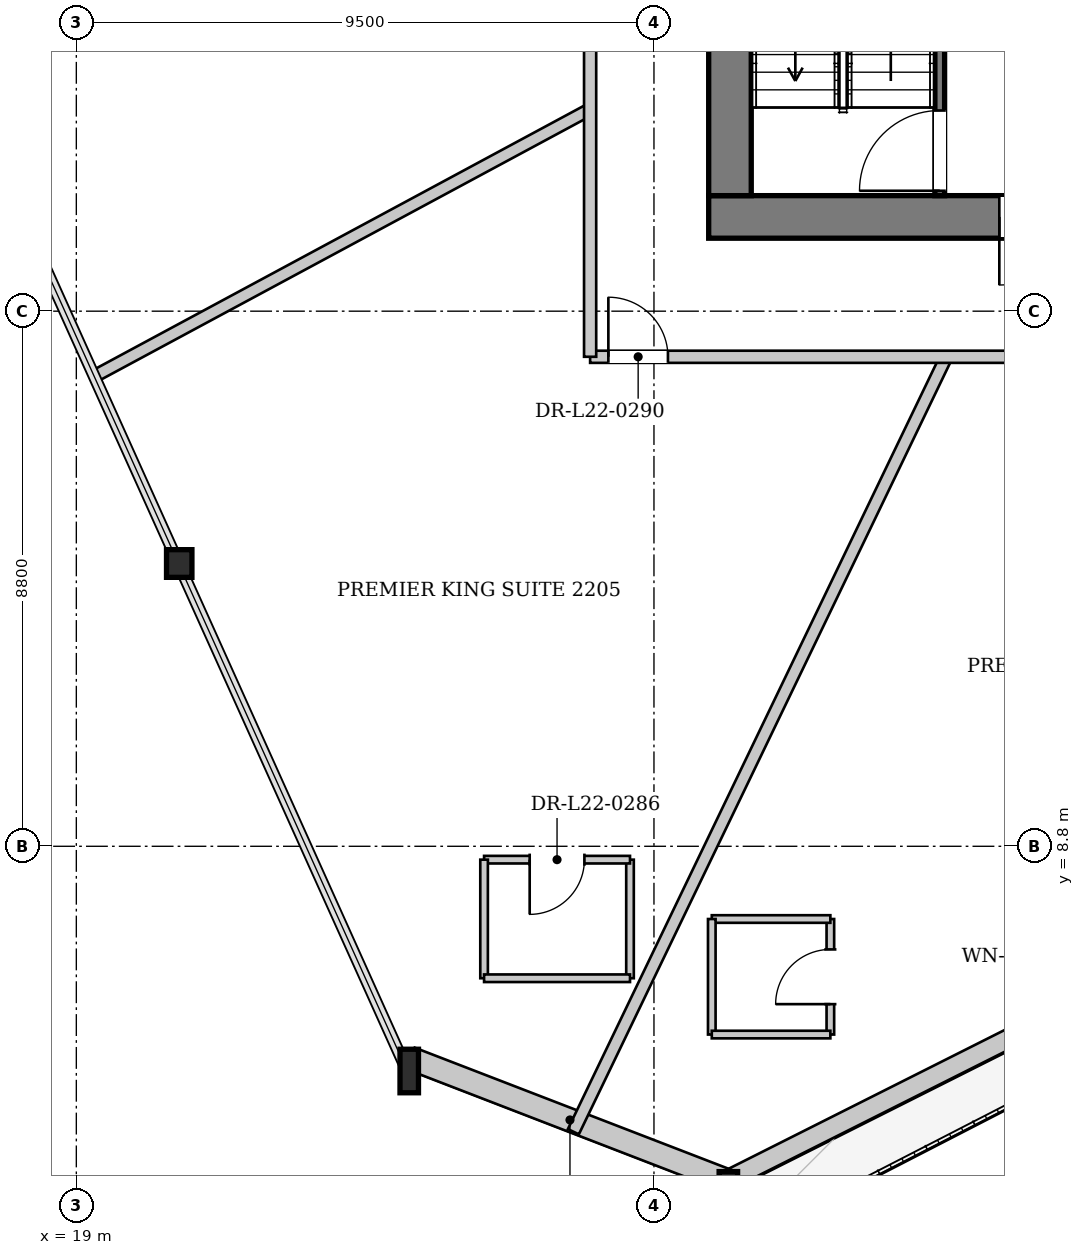
"""IFC4 building model, lengths in metres.
Left out: names, types, materials, properties, quantities, classifications, styles, units other than length and angle.
Written with IfcOpenShell. Run it as: python <this file> out.ifc"""

import sys

from ifc_helpers import new_model, si_unit, direction, frame, frame_2d, origin, origin_2d, place, context, subcontext, project, spatial, rectangle, i_section, extrude, source, transform, mapped, element, fill, save


model = new_model("IFC4")
c1 = context("Model", 3, precision=1e-05, world=origin(), true_north=direction((0.0, 1.0)))
c2 = subcontext(c1, "Body", "Model", "MODEL_VIEW")
j1 = project(units=[si_unit("LENGTHUNIT", "METRE"), si_unit("PLANEANGLEUNIT", "RADIAN")], contexts=[c1])
p1 = place(None, origin())
s1 = spatial("IfcSite", under=j1, at=p1, CompositionType="ELEMENT")
p2 = place(p1, origin())
s2 = spatial("IfcBuilding", under=s1, at=p2, CompositionType="ELEMENT")
p3 = place(p2, frame((0.0, 0.0, 87.95)))
s3 = spatial("IfcBuildingStorey", under=s2, at=p3, CompositionType="ELEMENT", Elevation=87.95)
m1 = source(origin(), c2, "Body", "SweptSolid", [
    extrude(i_section(OverallWidth=0.418, OverallDepth=0.455, WebThickness=0.038, FlangeThickness=0.059, at=origin_2d()), origin(), (0.0, 0.0, 1.0), 3.386),
])
p4 = place(p3, frame((20.664, 13.488, 0.0), z_axis=(0.016942485509, -0.022349661735, 0.999606645038), x_axis=(0.796904634527, 0.604105126174, 0.0)))
e1 = element("IfcColumn", 1, at=p4, inside=s3, PredefinedType="COLUMN", context=c2, shape_type="MappedRepresentation", body=[
    mapped(m1, transform((0.0, 0.0, 0.0), x_axis=(1.0, 0.0, 0.0), y_axis=(0.0, 1.0, 0.0), z_axis=(0.0, 0.0, 1.0), scale=1.0)),
])
m2 = source(origin(), c2, "Body", "SweptSolid", [
    extrude(i_section(OverallWidth=0.304, OverallDepth=0.716, WebThickness=0.021, FlangeThickness=0.04, at=origin_2d()), origin(), (0.0, 0.0, 1.0), 3.387),
])
p5 = place(p3, frame((24.428, 5.134, 0.0), z_axis=(0.027752837816, -0.017444640913, 0.999462587842), x_axis=(0.532171545218, 0.846636549211, 0.0)))
e2 = element("IfcColumn", 2, at=p5, inside=s3, PredefinedType="COLUMN", context=c2, shape_type="MappedRepresentation", body=[
    mapped(m2, transform((0.0, 0.0, 0.0), x_axis=(1.0, 0.0, 0.0), y_axis=(0.0, 1.0, 0.0), z_axis=(0.0, 0.0, 1.0), scale=1.0)),
])
p6 = place(p3, frame((51.177, 14.101, 0.0), z_axis=(0.0, 0.0, 1.0), x_axis=(-0.893442427341, -0.449177725436, 0.0)))
e3 = element("IfcWall", 3, at=p6, inside=s3, PredefinedType="SOLIDWALL", context=c2, shape_type="SweptSolid", body=[
    extrude(rectangle(XDim=24.151, YDim=0.32, at=frame_2d((12.075, 0.0))), origin(), (0.0, 0.0, 1.0), 2.692),
])
p7 = place(p6, frame((7.178, 0.0, 0.0)))
e4 = element("IfcOpeningElement", 4, at=p7, cuts=e3, PredefinedType="OPENING", context=c2, shape_type="SweptSolid", body=[
    extrude(rectangle(XDim=1.1, YDim=2.3, at=frame_2d((0.55, 1.15))), frame((0.0, 0.17, 0.0), z_axis=(0.0, -1.0, 0.0), x_axis=(1.0, 0.0, 0.0)), (0.0, 0.0, 1.0), 0.34),
])
p8 = place(p6, frame((16.971, 0.0, 0.372)))
e5 = element("IfcOpeningElement", 5, at=p8, cuts=e3, PredefinedType="OPENING", context=c2, shape_type="SweptSolid", body=[
    extrude(rectangle(XDim=1.8, YDim=2.2, at=frame_2d((0.9, 1.1))), frame((0.0, 0.17, 0.0), z_axis=(0.0, -1.0, 0.0), x_axis=(1.0, 0.0, 0.0)), (0.0, 0.0, 1.0), 0.34),
])
p9 = place(p3, frame((29.74, 3.288, 0.0), z_axis=(0.0, 0.0, 1.0), x_axis=(-0.932954356453, 0.359994678816, 0.0)))
e6 = element("IfcWall", 6, at=p9, inside=s3, PredefinedType="SOLIDWALL", context=c2, shape_type="SweptSolid", body=[
    extrude(rectangle(XDim=5.621, YDim=0.38, at=frame_2d((2.811, 0.0))), origin(), (0.0, 0.0, 1.0), 2.692),
])
p10 = place(p3, frame((46.6, 19.15, 0.0), z_axis=(0.0, 0.0, 1.0), x_axis=(-1.0, 0.0, 0.0)))
e7 = element("IfcWall", 7, at=p10, inside=s3, PredefinedType="SHEAR", context=c2, shape_type="SweptSolid", body=[
    extrude(rectangle(XDim=17.2, YDim=0.7, at=frame_2d((8.6, 0.0))), origin(), (0.0, 0.0, 1.0), 3.3),
])
p11 = place(p10, frame((4.8, 0.0, 0.0)))
e8 = element("IfcOpeningElement", 8, at=p11, cuts=e7, PredefinedType="OPENING", context=c2, shape_type="SweptSolid", body=[
    extrude(rectangle(XDim=1.12, YDim=2.25, at=frame_2d((0.56, 1.125))), frame((0.0, 0.36, 0.0), z_axis=(0.0, -1.0, 0.0), x_axis=(1.0, 0.0, 0.0)), (0.0, 0.0, 1.0), 0.72),
])
p12 = place(p10, frame((11.3, 0.0, 0.0)))
e9 = element("IfcOpeningElement", 9, at=p12, cuts=e7, PredefinedType="OPENING", context=c2, shape_type="SweptSolid", body=[
    extrude(rectangle(XDim=1.12, YDim=2.25, at=frame_2d((0.56, 1.125))), frame((0.0, 0.36, 0.0), z_axis=(0.0, -1.0, 0.0), x_axis=(1.0, 0.0, 0.0)), (0.0, 0.0, 1.0), 0.72),
])
p13 = place(p3, frame((29.75, 19.5, 0.0), z_axis=(0.0, 0.0, 1.0), x_axis=(0.0, 1.0, 0.0)))
e10 = element("IfcWall", 10, at=p13, inside=s3, PredefinedType="SHEAR", context=c2, shape_type="SweptSolid", body=[
    extrude(rectangle(XDim=14.2, YDim=0.7, at=frame_2d((7.1, 0.0))), origin(), (0.0, 0.0, 1.0), 3.3),
])
p14 = place(p13, frame((7.42, 0.0, 0.0)))
e11 = element("IfcOpeningElement", 11, at=p14, cuts=e10, PredefinedType="OPENING", context=c2, shape_type="SweptSolid", body=[
    extrude(rectangle(XDim=1.6, YDim=2.2, at=frame_2d((0.8, 1.1))), frame((0.0, 0.36, 0.0), z_axis=(0.0, -1.0, 0.0), x_axis=(1.0, 0.0, 0.0)), (0.0, 0.0, 1.0), 0.72),
])
p15 = place(p3, frame((33.2, 19.5, 0.0), z_axis=(0.0, 0.0, 1.0), x_axis=(0.0, 1.0, 0.0)))
e12 = element("IfcWall", 12, at=p15, inside=s3, PredefinedType="PARTITIONING", context=c2, shape_type="SweptSolid", body=[
    extrude(rectangle(XDim=7.46, YDim=0.16, at=frame_2d((3.73, 0.0))), origin(), (0.0, 0.0, 1.0), 3.3),
])
p16 = place(p15, frame((0.08, 0.0, 0.0)))
e13 = element("IfcOpeningElement", 13, at=p16, cuts=e12, PredefinedType="OPENING", context=c2, shape_type="SweptSolid", body=[
    extrude(rectangle(XDim=1.32, YDim=2.2, at=frame_2d((0.66, 1.1))), frame((0.0, 0.09, 0.0), z_axis=(0.0, -1.0, 0.0), x_axis=(1.0, 0.0, 0.0)), (0.0, 0.0, 1.0), 0.18),
])
p17 = place(p3, frame((27.45, 20.919, 0.0), z_axis=(0.0, 0.0, 1.0), x_axis=(-0.880473647021, -0.474095092678, 0.0)))
e14 = element("IfcWall", 14, at=p17, inside=s3, PredefinedType="PARTITIONING", context=c2, shape_type="SweptSolid", body=[
    extrude(rectangle(XDim=9.233, YDim=0.2, at=frame_2d((4.617, 0.0))), origin(), (0.0, 0.0, 1.0), 3.3),
])
p18 = place(p3, frame((33.308, 16.85, 0.0), z_axis=(0.0, 0.0, 1.0), x_axis=(-0.433656268432, -0.901078376641, 0.0)))
e15 = element("IfcWall", 15, at=p18, inside=s3, PredefinedType="PARTITIONING", context=c2, shape_type="SweptSolid", body=[
    extrude(rectangle(XDim=14.143, YDim=0.2, at=frame_2d((7.071, 0.0))), origin(), (0.0, 0.0, 1.0), 3.3),
])
p19 = place(p3, frame((28.106, 6.63, 0.0), z_axis=(0.0, 0.0, 1.0), x_axis=(0.0, 1.0, 0.0)))
e16 = element("IfcWall", 16, at=p19, inside=s3, PredefinedType="PARTITIONING", context=c2, shape_type="SweptSolid", body=[
    extrude(rectangle(XDim=1.95, YDim=0.125, at=frame_2d((0.975, 0.0))), origin(), (0.0, 0.0, 1.0), 3.3),
])
p20 = place(p3, frame((28.106, 8.58, 0.0), z_axis=(0.0, 0.0, 1.0), x_axis=(-1.0, 0.0, 0.0)))
e17 = element("IfcWall", 17, at=p20, inside=s3, PredefinedType="PARTITIONING", context=c2, shape_type="SweptSolid", body=[
    extrude(rectangle(XDim=2.4, YDim=0.125, at=frame_2d((1.2, 0.0))), origin(), (0.0, 0.0, 1.0), 3.3),
])
p21 = place(p20, frame((0.75, 0.0, 0.0)))
e18 = element("IfcOpeningElement", 18, at=p21, cuts=e17, PredefinedType="OPENING", context=c2, shape_type="SweptSolid", body=[
    extrude(rectangle(XDim=0.9, YDim=2.1, at=frame_2d((0.45, 1.05))), frame((0.0, 0.073, 0.0), z_axis=(0.0, -1.0, 0.0), x_axis=(1.0, 0.0, 0.0)), (0.0, 0.0, 1.0), 0.145),
])
p22 = place(p3, frame((25.706, 8.58, 0.0), z_axis=(0.0, 0.0, 1.0), x_axis=(0.0, -1.0, 0.0)))
e19 = element("IfcWall", 19, at=p22, inside=s3, PredefinedType="PARTITIONING", context=c2, shape_type="SweptSolid", body=[
    extrude(rectangle(XDim=1.95, YDim=0.125, at=frame_2d((0.975, 0.0))), origin(), (0.0, 0.0, 1.0), 2.795),
])
p23 = place(p3, frame((25.706, 6.63, 0.0), z_axis=(0.0, 0.0, 1.0), x_axis=(1.0, 0.0, 0.0)))
e20 = element("IfcWall", 20, at=p23, inside=s3, PredefinedType="PARTITIONING", context=c2, shape_type="SweptSolid", body=[
    extrude(rectangle(XDim=2.4, YDim=0.125, at=frame_2d((1.2, 0.0))), origin(), (0.0, 0.0, 1.0), 3.3),
])
p24 = place(p3, frame((31.401, 5.704, 0.0), z_axis=(0.0, 0.0, 1.0), x_axis=(0.0, 1.0, 0.0)))
e21 = element("IfcWall", 21, at=p24, inside=s3, PredefinedType="PARTITIONING", context=c2, shape_type="SweptSolid", body=[
    extrude(rectangle(XDim=1.9, YDim=0.125, at=frame_2d((0.95, 0.0))), origin(), (0.0, 0.0, 1.0), 2.795),
])
p25 = place(p24, frame((0.5, 0.0, 0.0)))
e22 = element("IfcOpeningElement", 22, at=p25, cuts=e21, PredefinedType="OPENING", context=c2, shape_type="SweptSolid", body=[
    extrude(rectangle(XDim=0.9, YDim=2.1, at=frame_2d((0.45, 1.05))), frame((0.0, 0.073, 0.0), z_axis=(0.0, -1.0, 0.0), x_axis=(1.0, 0.0, 0.0)), (0.0, 0.0, 1.0), 0.145),
])
p26 = place(p3, frame((31.401, 7.604, 0.0), z_axis=(0.0, 0.0, 1.0), x_axis=(-1.0, 0.0, 0.0)))
e23 = element("IfcWall", 23, at=p26, inside=s3, PredefinedType="PARTITIONING", context=c2, shape_type="SweptSolid", body=[
    extrude(rectangle(XDim=1.95, YDim=0.125, at=frame_2d((0.975, 0.0))), origin(), (0.0, 0.0, 1.0), 3.3),
])
p27 = place(p3, frame((29.451, 7.604, 0.0), z_axis=(0.0, 0.0, 1.0), x_axis=(0.0, -1.0, 0.0)))
e24 = element("IfcWall", 24, at=p27, inside=s3, PredefinedType="PARTITIONING", context=c2, shape_type="SweptSolid", body=[
    extrude(rectangle(XDim=1.9, YDim=0.125, at=frame_2d((0.95, 0.0))), origin(), (0.0, 0.0, 1.0), 3.3),
])
p28 = place(p3, frame((29.451, 5.704, 0.0), z_axis=(0.0, 0.0, 1.0), x_axis=(1.0, 0.0, 0.0)))
e25 = element("IfcWall", 25, at=p28, inside=s3, PredefinedType="PARTITIONING", context=c2, shape_type="SweptSolid", body=[
    extrude(rectangle(XDim=1.95, YDim=0.125, at=frame_2d((0.975, 0.0))), origin(), (0.0, 0.0, 1.0), 3.3),
])
p29 = place(p3, frame((27.45, 16.85, 0.0), z_axis=(0.0, 0.0, 1.0), x_axis=(1.0, 0.0, 0.0)))
e26 = element("IfcWall", 26, at=p29, inside=s3, PredefinedType="PARTITIONING", context=c2, shape_type="SweptSolid", body=[
    extrude(rectangle(XDim=21.1, YDim=0.2, at=frame_2d((10.55, 0.0))), origin(), (0.0, 0.0, 1.0), 3.3),
])
p30 = place(p29, frame((0.3, 0.0, 0.0)))
e27 = element("IfcOpeningElement", 27, at=p30, cuts=e26, PredefinedType="OPENING", context=c2, shape_type="SweptSolid", body=[
    extrude(rectangle(XDim=0.98, YDim=2.15, at=frame_2d((0.49, 1.075))), frame((0.0, 0.11, 0.0), z_axis=(0.0, -1.0, 0.0), x_axis=(1.0, 0.0, 0.0)), (0.0, 0.0, 1.0), 0.22),
])
p31 = place(p29, frame((8.024, 0.0, 0.0)))
e28 = element("IfcOpeningElement", 28, at=p31, cuts=e26, PredefinedType="OPENING", context=c2, shape_type="SweptSolid", body=[
    extrude(rectangle(XDim=0.98, YDim=2.15, at=frame_2d((0.49, 1.075))), frame((0.0, 0.11, 0.0), z_axis=(0.0, -1.0, 0.0), x_axis=(1.0, 0.0, 0.0)), (0.0, 0.0, 1.0), 0.22),
])
p32 = place(p29, frame((17.403, 0.0, 0.0)))
e29 = element("IfcOpeningElement", 29, at=p32, cuts=e26, PredefinedType="OPENING", context=c2, shape_type="SweptSolid", body=[
    extrude(rectangle(XDim=0.98, YDim=2.15, at=frame_2d((0.49, 1.075))), frame((0.0, 0.11, 0.0), z_axis=(0.0, -1.0, 0.0), x_axis=(1.0, 0.0, 0.0)), (0.0, 0.0, 1.0), 0.22),
])
p33 = place(p3, frame((27.45, 16.85, 0.0), z_axis=(0.0, 0.0, 1.0), x_axis=(0.0, 1.0, 0.0)))
e30 = element("IfcWall", 30, at=p33, inside=s3, PredefinedType="PARTITIONING", context=c2, shape_type="SweptSolid", body=[
    extrude(rectangle(XDim=19.5, YDim=0.2, at=frame_2d((9.75, 0.0))), origin(), (0.0, 0.0, 1.0), 3.3),
])
p34 = place(p33, frame((15.525, 0.0, 0.0)))
e31 = element("IfcOpeningElement", 31, at=p34, cuts=e30, PredefinedType="OPENING", context=c2, shape_type="SweptSolid", body=[
    extrude(rectangle(XDim=0.98, YDim=2.15, at=frame_2d((0.49, 1.075))), frame((0.0, 0.11, 0.0), z_axis=(0.0, -1.0, 0.0), x_axis=(1.0, 0.0, 0.0)), (0.0, 0.0, 1.0), 0.22),
])
p35 = place(p33, frame((6.543, 0.0, 0.0)))
e32 = element("IfcOpeningElement", 32, at=p35, cuts=e30, PredefinedType="OPENING", context=c2, shape_type="SweptSolid", body=[
    extrude(rectangle(XDim=0.98, YDim=2.15, at=frame_2d((0.49, 1.075))), frame((0.0, 0.11, 0.0), z_axis=(0.0, -1.0, 0.0), x_axis=(1.0, 0.0, 0.0)), (0.0, 0.0, 1.0), 0.22),
])
m3 = source(origin(), c2, "Body", "SweptSolid", [
    extrude(rectangle(XDim=1.12, YDim=2.25, at=frame_2d((0.56, 1.125))), frame((0.0, 0.025, 0.0), z_axis=(0.0, -1.0, 0.0), x_axis=(1.0, 0.0, 0.0)), (0.0, 0.0, 1.0), 0.05),
])
p36 = place(p12, origin())
e33 = element("IfcDoor", 33, at=p36, inside=s3, OperationType="SINGLE_SWING_RIGHT", PredefinedType="DOOR", context=c2, shape_type="MappedRepresentation", body=[
    mapped(m3, transform((0.0, 0.0, 0.0), x_axis=(1.0, 0.0, 0.0), y_axis=(0.0, 1.0, 0.0), z_axis=(0.0, 0.0, 1.0), scale=1.0)),
])
fill(e9, e33)
m4 = source(origin(), c2, "Body", "SweptSolid", [
    extrude(rectangle(XDim=1.32, YDim=2.2, at=frame_2d((0.66, 1.1))), frame((0.0, 0.025, 0.0), z_axis=(0.0, -1.0, 0.0), x_axis=(1.0, 0.0, 0.0)), (0.0, 0.0, 1.0), 0.05),
])
p37 = place(p16, origin())
e34 = element("IfcDoor", 34, at=p37, inside=s3, OperationType="SINGLE_SWING_LEFT", PredefinedType="DOOR", context=c2, shape_type="MappedRepresentation", body=[
    mapped(m4, transform((0.0, 0.0, 0.0), x_axis=(1.0, 0.0, 0.0), y_axis=(0.0, 1.0, 0.0), z_axis=(0.0, 0.0, 1.0), scale=1.0)),
])
fill(e13, e34)
m5 = source(origin(), c2, "Body", "SweptSolid", [
    extrude(rectangle(XDim=0.9, YDim=2.1, at=frame_2d((0.45, 1.05))), frame((0.0, 0.025, 0.0), z_axis=(0.0, -1.0, 0.0), x_axis=(1.0, 0.0, 0.0)), (0.0, 0.0, 1.0), 0.05),
])
p38 = place(p21, origin())
e35 = element("IfcDoor", 35, at=p38, inside=s3, OperationType="SINGLE_SWING_RIGHT", PredefinedType="DOOR", context=c2, shape_type="MappedRepresentation", body=[
    mapped(m5, transform((0.0, 0.0, 0.0), x_axis=(1.0, 0.0, 0.0), y_axis=(0.0, 1.0, 0.0), z_axis=(0.0, 0.0, 1.0), scale=1.0)),
])
fill(e18, e35)
p39 = place(p25, origin())
e36 = element("IfcDoor", 36, at=p39, inside=s3, OperationType="SINGLE_SWING_LEFT", PredefinedType="DOOR", context=c2, shape_type="MappedRepresentation", body=[
    mapped(m5, transform((0.0, 0.0, 0.0), x_axis=(1.0, 0.0, 0.0), y_axis=(0.0, 1.0, 0.0), z_axis=(0.0, 0.0, 1.0), scale=1.0)),
])
fill(e22, e36)
m6 = source(origin(), c2, "Body", "SweptSolid", [
    extrude(rectangle(XDim=0.98, YDim=2.15, at=frame_2d((0.49, 1.075))), frame((0.0, 0.025, 0.0), z_axis=(0.0, -1.0, 0.0), x_axis=(1.0, 0.0, 0.0)), (0.0, 0.0, 1.0), 0.05),
])
p40 = place(p30, origin())
e37 = element("IfcDoor", 37, at=p40, inside=s3, OperationType="SINGLE_SWING_LEFT", PredefinedType="DOOR", context=c2, shape_type="MappedRepresentation", body=[
    mapped(m6, transform((0.0, 0.0, 0.0), x_axis=(1.0, 0.0, 0.0), y_axis=(0.0, 1.0, 0.0), z_axis=(0.0, 0.0, 1.0), scale=1.0)),
])
fill(e27, e37)
save(model, sys.argv[1])
